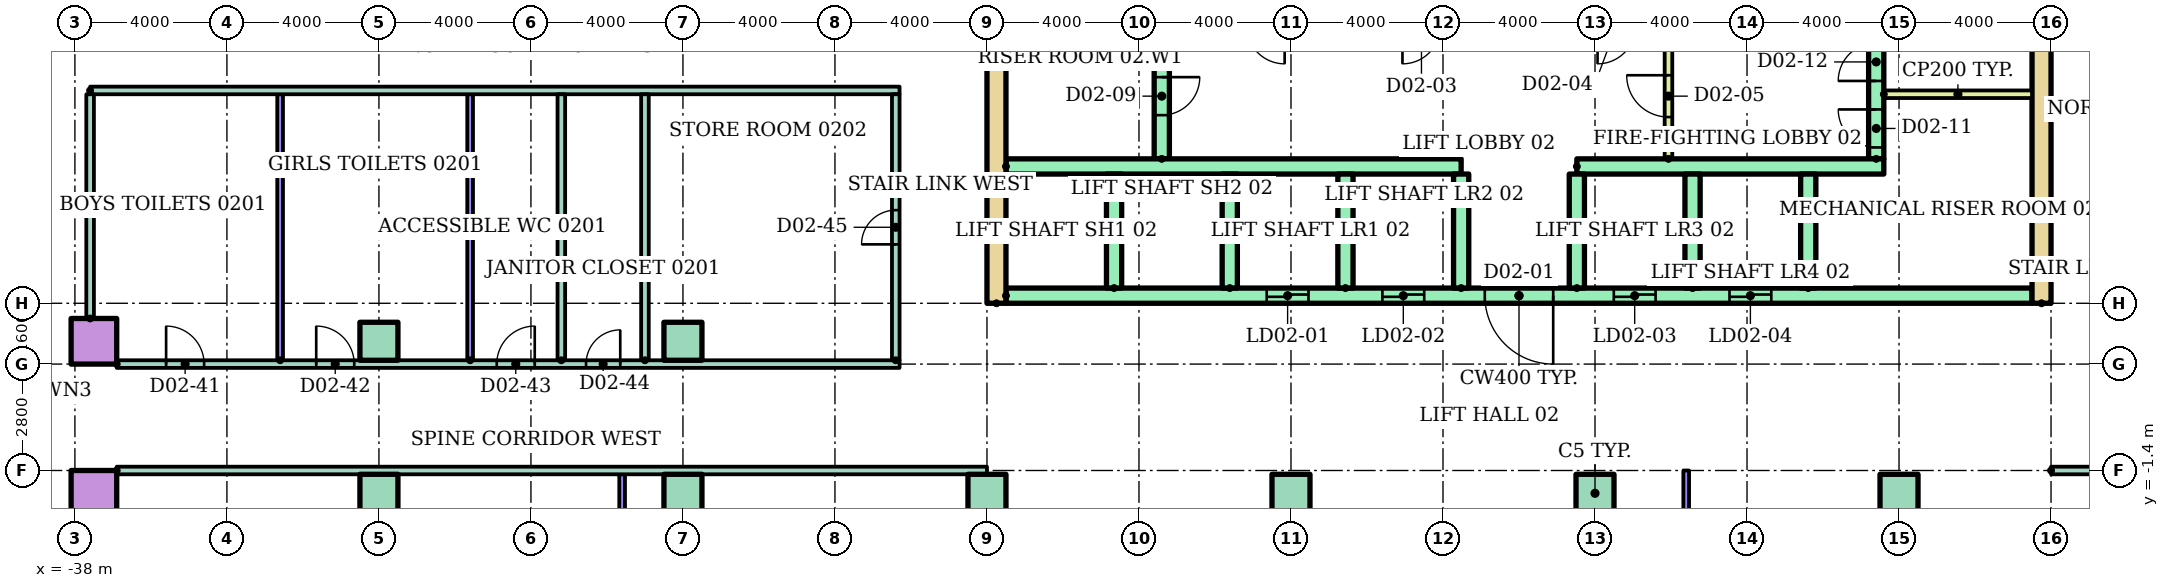
"""IFC4 building model, lengths in metres.
Left out: names, types, materials, properties, quantities, classifications, styles, units other than length and angle.
Written with IfcOpenShell. Run it as: python <this file> out.ifc"""

import sys

from ifc_helpers import new_model, si_unit, direction, frame, frame_2d, origin, origin_2d, place, context, subcontext, project, spatial, rectangle, hollow_rectangle, extrude, element, fill, save


model = new_model("IFC4")
c1 = context("Model", 3, precision=1e-05, world=origin(), true_north=direction((0.0, 1.0)))
c2 = subcontext(c1, "Body", "Model", "MODEL_VIEW")
j1 = project(units=[si_unit("LENGTHUNIT", "METRE"), si_unit("PLANEANGLEUNIT", "RADIAN")], contexts=[c1])
p1 = place(None, origin())
s1 = spatial("IfcSite", under=j1, at=p1, CompositionType="ELEMENT")
p2 = place(p1, origin())
s2 = spatial("IfcBuilding", under=s1, at=p2, CompositionType="ELEMENT")
p3 = place(p2, frame((0.0, 0.0, 10.0)))
s3 = spatial("IfcBuildingStorey", under=s2, at=p3, CompositionType="ELEMENT", Elevation=10.0)
p4 = place(p3, frame((-37.5, -2.0, 0.0)))
e1 = element("IfcColumn", 1, at=p4, inside=s3, PredefinedType="COLUMN", context=c2, shape_type="SweptSolid", body=[
    extrude(hollow_rectangle(XDim=1.2, YDim=1.2, WallThickness=0.06, at=origin_2d()), origin(), (0.0, 0.0, 1.0), 4.0),
])
for number, where in (
    (2, (-30.0, -2.0, 0.0)),
    (3, (-22.0, -2.0, 0.0)),
    (4, (-14.0, -2.0, 0.0)),
    (5, (-6.0, -2.0, 0.0)),
    (6, (2.0, -2.0, 0.0)),
    (7, (10.0, -2.0, 0.0)),
):
    element("IfcColumn", number, at=place(p3, frame(where)), inside=s3, PredefinedType="COLUMN", context=c2, shape_type="SweptSolid", body=[
        extrude(rectangle(XDim=1.0, YDim=1.0, at=origin_2d()), origin(), (0.0, 0.0, 1.0), 4.0),
    ])
p5 = place(p3, frame((-37.5, 2.0, 0.0)))
e8 = element("IfcColumn", 8, at=p5, inside=s3, PredefinedType="COLUMN", context=c2, shape_type="SweptSolid", body=[
    extrude(hollow_rectangle(XDim=1.2, YDim=1.2, WallThickness=0.06, at=origin_2d()), origin(), (0.0, 0.0, 1.0), 4.0),
])
for number, where in (
    (9, (-30.0, 2.0, 0.0)),
    (10, (-22.0, 2.0, 0.0)),
):
    element("IfcColumn", number, at=place(p3, frame(where)), inside=s3, PredefinedType="COLUMN", context=c2, shape_type="SweptSolid", body=[
        extrude(rectangle(XDim=1.0, YDim=1.0, at=origin_2d()), origin(), (0.0, 0.0, 1.0), 4.0),
    ])
for number, where, z_axis, x_axis in (
    (11, (-13.75, 3.0, 0.0), (0.0, 0.0, 1.0), (0.0, 1.0, 0.0)),
    (12, (13.75, 3.0, 0.0), (0.0, 0.0, 1.0), (0.0, 1.0, 0.0)),
):
    element("IfcWall", number, at=place(p3, frame(where, z_axis=z_axis, x_axis=x_axis)), inside=s3, PredefinedType="SHEAR", context=c2, shape_type="SweptSolid", body=[
        extrude(rectangle(XDim=17.0, YDim=0.5, at=frame_2d((8.5, 0.0))), origin(), (0.0, 0.0, 1.0), 3.7),
    ])
p6 = place(p3, frame((-9.4, 6.8, 0.0), z_axis=(0.0, 0.0, 1.0), x_axis=(0.0, 1.0, 0.0)))
e13 = element("IfcWall", 13, at=p6, inside=s3, PredefinedType="SHEAR", context=c2, shape_type="SweptSolid", body=[
    extrude(rectangle(XDim=12.7, YDim=0.4, at=frame_2d((6.35, 0.0))), origin(), (0.0, 0.0, 1.0), 3.7),
])
p7 = place(p6, frame((1.15, 0.0, 0.0)))
e14 = element("IfcOpeningElement", 14, at=p7, cuts=e13, PredefinedType="OPENING", context=c2, shape_type="SweptSolid", body=[
    extrude(rectangle(XDim=1.0, YDim=2.1, at=frame_2d((0.5, 1.05))), frame((0.0, 0.21, 0.0), z_axis=(0.0, -1.0, 0.0), x_axis=(1.0, 0.0, 0.0)), (0.0, 0.0, 1.0), 0.42),
])
p8 = place(p6, frame((7.925, 0.0, 0.0)))
e15 = element("IfcOpeningElement", 15, at=p8, cuts=e13, PredefinedType="OPENING", context=c2, shape_type="SweptSolid", body=[
    extrude(rectangle(XDim=1.0, YDim=2.1, at=frame_2d((0.5, 1.05))), frame((0.0, 0.21, 0.0), z_axis=(0.0, -1.0, 0.0), x_axis=(1.0, 0.0, 0.0)), (0.0, 0.0, 1.0), 0.42),
])
p9 = place(p3, frame((9.4, 6.8, 0.0), z_axis=(0.0, 0.0, 1.0), x_axis=(0.0, 1.0, 0.0)))
e16 = element("IfcWall", 16, at=p9, inside=s3, PredefinedType="SHEAR", context=c2, shape_type="SweptSolid", body=[
    extrude(rectangle(XDim=12.7, YDim=0.4, at=frame_2d((6.35, 0.0))), origin(), (0.0, 0.0, 1.0), 3.7),
])
p10 = place(p9, frame((0.3, 0.0, 0.0)))
e17 = element("IfcOpeningElement", 17, at=p10, cuts=e16, PredefinedType="OPENING", context=c2, shape_type="SweptSolid", body=[
    extrude(rectangle(XDim=1.0, YDim=2.1, at=frame_2d((0.5, 1.05))), frame((0.0, 0.21, 0.0), z_axis=(0.0, -1.0, 0.0), x_axis=(1.0, 0.0, 0.0)), (0.0, 0.0, 1.0), 0.42),
])
p11 = place(p9, frame((2.05, 0.0, 0.0)))
e18 = element("IfcOpeningElement", 18, at=p11, cuts=e16, PredefinedType="OPENING", context=c2, shape_type="SweptSolid", body=[
    extrude(rectangle(XDim=1.0, YDim=2.1, at=frame_2d((0.5, 1.05))), frame((0.0, 0.21, 0.0), z_axis=(0.0, -1.0, 0.0), x_axis=(1.0, 0.0, 0.0)), (0.0, 0.0, 1.0), 0.42),
])
p12 = place(p9, frame((7.925, 0.0, 0.0)))
e19 = element("IfcOpeningElement", 19, at=p12, cuts=e16, PredefinedType="OPENING", context=c2, shape_type="SweptSolid", body=[
    extrude(rectangle(XDim=1.0, YDim=2.1, at=frame_2d((0.5, 1.05))), frame((0.0, 0.21, 0.0), z_axis=(0.0, -1.0, 0.0), x_axis=(1.0, 0.0, 0.0)), (0.0, 0.0, 1.0), 0.42),
])
p13 = place(p3, frame((-13.5, 3.2, 0.0)))
e20 = element("IfcWall", 20, at=p13, inside=s3, PredefinedType="SHEAR", context=c2, shape_type="SweptSolid", body=[
    extrude(rectangle(XDim=27.0, YDim=0.4, at=frame_2d((13.5, 0.0))), origin(), (0.0, 0.0, 1.0), 3.7),
])
p14 = place(p13, frame((6.861, 0.0, 0.0)))
e21 = element("IfcOpeningElement", 21, at=p14, cuts=e20, PredefinedType="OPENING", context=c2, shape_type="SweptSolid", body=[
    extrude(rectangle(XDim=1.1, YDim=2.1, at=frame_2d((0.55, 1.05))), frame((0.0, 0.21, 0.0), z_axis=(0.0, -1.0, 0.0), x_axis=(1.0, 0.0, 0.0)), (0.0, 0.0, 1.0), 0.42),
])
p15 = place(p13, frame((9.906, 0.0, 0.0)))
e22 = element("IfcOpeningElement", 22, at=p15, cuts=e20, PredefinedType="OPENING", context=c2, shape_type="SweptSolid", body=[
    extrude(rectangle(XDim=1.1, YDim=2.1, at=frame_2d((0.55, 1.05))), frame((0.0, 0.21, 0.0), z_axis=(0.0, -1.0, 0.0), x_axis=(1.0, 0.0, 0.0)), (0.0, 0.0, 1.0), 0.42),
])
p16 = place(p13, frame((15.994, 0.0, 0.0)))
e23 = element("IfcOpeningElement", 23, at=p16, cuts=e20, PredefinedType="OPENING", context=c2, shape_type="SweptSolid", body=[
    extrude(rectangle(XDim=1.1, YDim=2.1, at=frame_2d((0.55, 1.05))), frame((0.0, 0.21, 0.0), z_axis=(0.0, -1.0, 0.0), x_axis=(1.0, 0.0, 0.0)), (0.0, 0.0, 1.0), 0.42),
])
p17 = place(p13, frame((19.039, 0.0, 0.0)))
e24 = element("IfcOpeningElement", 24, at=p17, cuts=e20, PredefinedType="OPENING", context=c2, shape_type="SweptSolid", body=[
    extrude(rectangle(XDim=1.1, YDim=2.1, at=frame_2d((0.55, 1.05))), frame((0.0, 0.21, 0.0), z_axis=(0.0, -1.0, 0.0), x_axis=(1.0, 0.0, 0.0)), (0.0, 0.0, 1.0), 0.42),
])
p18 = place(p13, frame((12.6, 0.0, 0.0)))
e25 = element("IfcOpeningElement", 25, at=p18, cuts=e20, PredefinedType="OPENING", context=c2, shape_type="SweptSolid", body=[
    extrude(rectangle(XDim=1.8, YDim=2.1, at=frame_2d((0.9, 1.05))), frame((0.0, 0.21, 0.0), z_axis=(0.0, -1.0, 0.0), x_axis=(1.0, 0.0, 0.0)), (0.0, 0.0, 1.0), 0.42),
])
p19 = place(p3, frame((-13.5, 6.6, 0.0)))
e26 = element("IfcWall", 26, at=p19, inside=s3, PredefinedType="SHEAR", context=c2, shape_type="SweptSolid", body=[
    extrude(rectangle(XDim=11.978, YDim=0.4, at=frame_2d((5.989, 0.0))), origin(), (0.0, 0.0, 1.0), 3.7),
])
p20 = place(p3, frame((1.522, 6.6, 0.0)))
e27 = element("IfcWall", 27, at=p20, inside=s3, PredefinedType="SHEAR", context=c2, shape_type="SweptSolid", body=[
    extrude(rectangle(XDim=8.078, YDim=0.4, at=frame_2d((4.039, 0.0))), origin(), (0.0, 0.0, 1.0), 3.7),
])
for number, where, z_axis, x_axis in (
    (28, (-10.656, 3.4, 0.0), (0.0, 0.0, 1.0), (0.0, 1.0, 0.0)),
    (29, (-7.611, 3.4, 0.0), (0.0, 0.0, 1.0), (0.0, 1.0, 0.0)),
    (30, (-4.567, 3.4, 0.0), (0.0, 0.0, 1.0), (0.0, 1.0, 0.0)),
    (31, (-1.522, 3.4, 0.0), (0.0, 0.0, 1.0), (0.0, 1.0, 0.0)),
    (32, (1.522, 3.4, 0.0), (0.0, 0.0, 1.0), (0.0, 1.0, 0.0)),
    (33, (4.567, 3.4, 0.0), (0.0, 0.0, 1.0), (0.0, 1.0, 0.0)),
    (34, (7.611, 3.4, 0.0), (0.0, 0.0, 1.0), (0.0, 1.0, 0.0)),
):
    element("IfcWall", number, at=place(p3, frame(where, z_axis=z_axis, x_axis=x_axis)), inside=s3, PredefinedType="SHEAR", context=c2, shape_type="SweptSolid", body=[
        extrude(rectangle(XDim=3.0, YDim=0.4, at=frame_2d((1.5, 0.0))), origin(), (0.0, 0.0, 1.0), 3.7),
    ])
p21 = place(p3, frame((3.933, 6.8, 0.0), z_axis=(0.0, 0.0, 1.0), x_axis=(0.0, 1.0, 0.0)))
e35 = element("IfcWall", 35, at=p21, inside=s3, PredefinedType="PARTITIONING", context=c2, shape_type="SweptSolid", body=[
    extrude(rectangle(XDim=3.3, YDim=0.2, at=frame_2d((1.65, 0.0))), origin(), (0.0, 0.0, 1.0), 3.7),
])
p22 = place(p21, frame((1.1, 0.0, 0.0)))
e36 = element("IfcOpeningElement", 36, at=p22, cuts=e35, PredefinedType="OPENING", context=c2, shape_type="SweptSolid", body=[
    extrude(rectangle(XDim=1.1, YDim=2.1, at=frame_2d((0.55, 1.05))), frame((0.0, 0.11, 0.0), z_axis=(0.0, -1.0, 0.0), x_axis=(1.0, 0.0, 0.0)), (0.0, 0.0, 1.0), 0.22),
])
p23 = place(p3, frame((9.6, 8.5, 0.0)))
e37 = element("IfcWall", 37, at=p23, inside=s3, PredefinedType="PARTITIONING", context=c2, shape_type="SweptSolid", body=[
    extrude(rectangle(XDim=3.9, YDim=0.2, at=frame_2d((1.95, 0.0))), origin(), (0.0, 0.0, 1.0), 3.7),
])
for number, where in (
    (38, (-36.9, -1.4, 0.0)),
    (39, (14.0, -1.4, 0.0)),
):
    element("IfcWall", number, at=place(p3, frame(where)), inside=s3, PredefinedType="PARTITIONING", context=c2, shape_type="SweptSolid", body=[
        extrude(rectangle(XDim=22.9, YDim=0.2, at=frame_2d((11.45, 0.0))), origin(), (0.0, 0.0, 1.0), 3.7),
    ])
p24 = place(p3, frame((-36.9, 1.4, 0.0)))
e40 = element("IfcWall", 40, at=p24, inside=s3, PredefinedType="PARTITIONING", context=c2, shape_type="SweptSolid", body=[
    extrude(rectangle(XDim=20.6, YDim=0.2, at=frame_2d((10.3, 0.0))), origin(), (0.0, 0.0, 1.0), 3.7),
])
p25 = place(p24, frame((1.3, 0.0, 0.0)))
e41 = element("IfcOpeningElement", 41, at=p25, cuts=e40, PredefinedType="OPENING", context=c2, shape_type="SweptSolid", body=[
    extrude(rectangle(XDim=1.0, YDim=2.1, at=frame_2d((0.5, 1.05))), frame((0.0, 0.11, 0.0), z_axis=(0.0, -1.0, 0.0), x_axis=(1.0, 0.0, 0.0)), (0.0, 0.0, 1.0), 0.22),
])
p26 = place(p24, frame((5.25, 0.0, 0.0)))
e42 = element("IfcOpeningElement", 42, at=p26, cuts=e40, PredefinedType="OPENING", context=c2, shape_type="SweptSolid", body=[
    extrude(rectangle(XDim=1.0, YDim=2.1, at=frame_2d((0.5, 1.05))), frame((0.0, 0.11, 0.0), z_axis=(0.0, -1.0, 0.0), x_axis=(1.0, 0.0, 0.0)), (0.0, 0.0, 1.0), 0.22),
])
p27 = place(p24, frame((10.0, 0.0, 0.0)))
e43 = element("IfcOpeningElement", 43, at=p27, cuts=e40, PredefinedType="OPENING", context=c2, shape_type="SweptSolid", body=[
    extrude(rectangle(XDim=1.0, YDim=2.1, at=frame_2d((0.5, 1.05))), frame((0.0, 0.11, 0.0), z_axis=(0.0, -1.0, 0.0), x_axis=(1.0, 0.0, 0.0)), (0.0, 0.0, 1.0), 0.22),
])
p28 = place(p24, frame((12.35, 0.0, 0.0)))
e44 = element("IfcOpeningElement", 44, at=p28, cuts=e40, PredefinedType="OPENING", context=c2, shape_type="SweptSolid", body=[
    extrude(rectangle(XDim=0.9, YDim=2.1, at=frame_2d((0.45, 1.05))), frame((0.0, 0.11, 0.0), z_axis=(0.0, -1.0, 0.0), x_axis=(1.0, 0.0, 0.0)), (0.0, 0.0, 1.0), 0.22),
])
p29 = place(p3, frame((-37.6, 8.6, 0.0)))
e45 = element("IfcWall", 45, at=p29, inside=s3, PredefinedType="PARTITIONING", context=c2, shape_type="SweptSolid", body=[
    extrude(rectangle(XDim=21.3, YDim=0.2, at=frame_2d((10.65, 0.0))), origin(), (0.0, 0.0, 1.0), 3.7),
])
p30 = place(p3, frame((-37.6, 2.6, 0.0), z_axis=(0.0, 0.0, 1.0), x_axis=(0.0, 1.0, 0.0)))
e46 = element("IfcWall", 46, at=p30, inside=s3, PredefinedType="PARTITIONING", context=c2, shape_type="SweptSolid", body=[
    extrude(rectangle(XDim=5.9, YDim=0.2, at=frame_2d((2.95, 0.0))), origin(), (0.0, 0.0, 1.0), 3.7),
])
for number, where, z_axis, x_axis in (
    (47, (-32.6, 1.5, 0.0), (0.0, 0.0, 1.0), (0.0, 1.0, 0.0)),
    (48, (-27.6, 1.5, 0.0), (0.0, 0.0, 1.0), (0.0, 1.0, 0.0)),
):
    element("IfcWall", number, at=place(p3, frame(where, z_axis=z_axis, x_axis=x_axis)), inside=s3, PredefinedType="PARTITIONING", context=c2, shape_type="SweptSolid", body=[
        extrude(rectangle(XDim=7.0, YDim=0.15, at=frame_2d((3.5, 0.0))), origin(), (0.0, 0.0, 1.0), 3.7),
    ])
p31 = place(p3, frame((-25.2, 1.5, 0.0), z_axis=(0.0, 0.0, 1.0), x_axis=(0.0, 1.0, 0.0)))
e49 = element("IfcWall", 49, at=p31, inside=s3, PredefinedType="PARTITIONING", context=c2, shape_type="SweptSolid", body=[
    extrude(rectangle(XDim=7.0, YDim=0.2, at=frame_2d((3.5, 0.0))), origin(), (0.0, 0.0, 1.0), 3.7),
])
p32 = place(p3, frame((-23.6, -6.25, 0.0), z_axis=(0.0, 0.0, 1.0), x_axis=(0.0, 1.0, 0.0)))
e50 = element("IfcWall", 50, at=p32, inside=s3, PredefinedType="PARTITIONING", context=c2, shape_type="SweptSolid", body=[
    extrude(rectangle(XDim=4.75, YDim=0.15, at=frame_2d((2.375, 0.0))), origin(), (0.0, 0.0, 1.0), 3.7),
])
p33 = place(p3, frame((-23.0, 1.5, 0.0), z_axis=(0.0, 0.0, 1.0), x_axis=(0.0, 1.0, 0.0)))
e51 = element("IfcWall", 51, at=p33, inside=s3, PredefinedType="PARTITIONING", context=c2, shape_type="SweptSolid", body=[
    extrude(rectangle(XDim=7.0, YDim=0.2, at=frame_2d((3.5, 0.0))), origin(), (0.0, 0.0, 1.0), 3.7),
])
p34 = place(p3, frame((-16.4, 1.5, 0.0), z_axis=(0.0, 0.0, 1.0), x_axis=(0.0, 1.0, 0.0)))
e52 = element("IfcWall", 52, at=p34, inside=s3, PredefinedType="PARTITIONING", context=c2, shape_type="SweptSolid", body=[
    extrude(rectangle(XDim=7.0, YDim=0.2, at=frame_2d((3.5, 0.0))), origin(), (0.0, 0.0, 1.0), 3.7),
])
p35 = place(p34, frame((3.05, 0.0, 0.0)))
e53 = element("IfcOpeningElement", 53, at=p35, cuts=e52, PredefinedType="OPENING", context=c2, shape_type="SweptSolid", body=[
    extrude(rectangle(XDim=0.9, YDim=2.1, at=frame_2d((0.45, 1.05))), frame((0.0, 0.11, 0.0), z_axis=(0.0, -1.0, 0.0), x_axis=(1.0, 0.0, 0.0)), (0.0, 0.0, 1.0), 0.22),
])
p36 = place(p3, frame((4.4, -6.25, 0.0), z_axis=(0.0, 0.0, 1.0), x_axis=(0.0, 1.0, 0.0)))
e54 = element("IfcWall", 54, at=p36, inside=s3, PredefinedType="PARTITIONING", context=c2, shape_type="SweptSolid", body=[
    extrude(rectangle(XDim=4.85, YDim=0.15, at=frame_2d((2.425, 0.0))), origin(), (0.0, 0.0, 1.0), 3.7),
])
p37 = place(p14, origin())
e55 = element("IfcDoor", 55, at=p37, inside=s3, OperationType="SLIDING_TO_LEFT", PredefinedType="DOOR", context=c2, shape_type="SweptSolid", body=[
    extrude(rectangle(XDim=1.1, YDim=2.1, at=frame_2d((0.55, 1.05))), frame((0.0, 0.025, 0.0), z_axis=(0.0, -1.0, 0.0), x_axis=(1.0, 0.0, 0.0)), (0.0, 0.0, 1.0), 0.05),
])
fill(e21, e55)
p38 = place(p15, origin())
e56 = element("IfcDoor", 56, at=p38, inside=s3, OperationType="SLIDING_TO_LEFT", PredefinedType="DOOR", context=c2, shape_type="SweptSolid", body=[
    extrude(rectangle(XDim=1.1, YDim=2.1, at=frame_2d((0.55, 1.05))), frame((0.0, 0.025, 0.0), z_axis=(0.0, -1.0, 0.0), x_axis=(1.0, 0.0, 0.0)), (0.0, 0.0, 1.0), 0.05),
])
fill(e22, e56)
p39 = place(p16, origin())
e57 = element("IfcDoor", 57, at=p39, inside=s3, OperationType="SLIDING_TO_LEFT", PredefinedType="DOOR", context=c2, shape_type="SweptSolid", body=[
    extrude(rectangle(XDim=1.1, YDim=2.1, at=frame_2d((0.55, 1.05))), frame((0.0, 0.025, 0.0), z_axis=(0.0, -1.0, 0.0), x_axis=(1.0, 0.0, 0.0)), (0.0, 0.0, 1.0), 0.05),
])
fill(e23, e57)
p40 = place(p17, origin())
e58 = element("IfcDoor", 58, at=p40, inside=s3, OperationType="SLIDING_TO_LEFT", PredefinedType="DOOR", context=c2, shape_type="SweptSolid", body=[
    extrude(rectangle(XDim=1.1, YDim=2.1, at=frame_2d((0.55, 1.05))), frame((0.0, 0.025, 0.0), z_axis=(0.0, -1.0, 0.0), x_axis=(1.0, 0.0, 0.0)), (0.0, 0.0, 1.0), 0.05),
])
fill(e24, e58)
p41 = place(p18, frame((1.8, 0.0, 0.0), z_axis=(0.0, 0.0, 1.0), x_axis=(-1.0, 0.0, 0.0)))
e59 = element("IfcDoor", 59, at=p41, inside=s3, OperationType="DOUBLE_DOOR_SINGLE_SWING", PredefinedType="DOOR", context=c2, shape_type="SweptSolid", body=[
    extrude(rectangle(XDim=1.8, YDim=2.1, at=frame_2d((0.9, 1.05))), frame((0.0, 0.025, 0.0), z_axis=(0.0, -1.0, 0.0), x_axis=(1.0, 0.0, 0.0)), (0.0, 0.0, 1.0), 0.05),
])
fill(e25, e59)
p42 = place(p22, origin())
e60 = element("IfcDoor", 60, at=p42, inside=s3, OperationType="SINGLE_SWING_RIGHT", PredefinedType="DOOR", context=c2, shape_type="SweptSolid", body=[
    extrude(rectangle(XDim=1.1, YDim=2.1, at=frame_2d((0.55, 1.05))), frame((0.0, 0.025, 0.0), z_axis=(0.0, -1.0, 0.0), x_axis=(1.0, 0.0, 0.0)), (0.0, 0.0, 1.0), 0.05),
])
fill(e36, e60)
p43 = place(p7, frame((1.0, 0.0, 0.0), z_axis=(0.0, 0.0, 1.0), x_axis=(-1.0, 0.0, 0.0)))
e61 = element("IfcDoor", 61, at=p43, inside=s3, OperationType="SINGLE_SWING_RIGHT", PredefinedType="DOOR", context=c2, shape_type="SweptSolid", body=[
    extrude(rectangle(XDim=1.0, YDim=2.1, at=frame_2d((0.5, 1.05))), frame((0.0, 0.025, 0.0), z_axis=(0.0, -1.0, 0.0), x_axis=(1.0, 0.0, 0.0)), (0.0, 0.0, 1.0), 0.05),
])
fill(e14, e61)
p44 = place(p10, origin())
e62 = element("IfcDoor", 62, at=p44, inside=s3, OperationType="SINGLE_SWING_RIGHT", PredefinedType="DOOR", context=c2, shape_type="SweptSolid", body=[
    extrude(rectangle(XDim=1.0, YDim=2.1, at=frame_2d((0.5, 1.05))), frame((0.0, 0.025, 0.0), z_axis=(0.0, -1.0, 0.0), x_axis=(1.0, 0.0, 0.0)), (0.0, 0.0, 1.0), 0.05),
])
fill(e17, e62)
p45 = place(p11, origin())
e63 = element("IfcDoor", 63, at=p45, inside=s3, OperationType="SINGLE_SWING_LEFT", PredefinedType="DOOR", context=c2, shape_type="SweptSolid", body=[
    extrude(rectangle(XDim=1.0, YDim=2.1, at=frame_2d((0.5, 1.05))), frame((0.0, 0.025, 0.0), z_axis=(0.0, -1.0, 0.0), x_axis=(1.0, 0.0, 0.0)), (0.0, 0.0, 1.0), 0.05),
])
fill(e18, e63)
p46 = place(p25, origin())
e64 = element("IfcDoor", 64, at=p46, inside=s3, OperationType="SINGLE_SWING_LEFT", PredefinedType="DOOR", context=c2, shape_type="SweptSolid", body=[
    extrude(rectangle(XDim=1.0, YDim=2.1, at=frame_2d((0.5, 1.05))), frame((0.0, 0.025, 0.0), z_axis=(0.0, -1.0, 0.0), x_axis=(1.0, 0.0, 0.0)), (0.0, 0.0, 1.0), 0.05),
])
fill(e41, e64)
p47 = place(p26, origin())
e65 = element("IfcDoor", 65, at=p47, inside=s3, OperationType="SINGLE_SWING_LEFT", PredefinedType="DOOR", context=c2, shape_type="SweptSolid", body=[
    extrude(rectangle(XDim=1.0, YDim=2.1, at=frame_2d((0.5, 1.05))), frame((0.0, 0.025, 0.0), z_axis=(0.0, -1.0, 0.0), x_axis=(1.0, 0.0, 0.0)), (0.0, 0.0, 1.0), 0.05),
])
fill(e42, e65)
p48 = place(p27, origin())
e66 = element("IfcDoor", 66, at=p48, inside=s3, OperationType="SINGLE_SWING_RIGHT", PredefinedType="DOOR", context=c2, shape_type="SweptSolid", body=[
    extrude(rectangle(XDim=1.0, YDim=2.1, at=frame_2d((0.5, 1.05))), frame((0.0, 0.025, 0.0), z_axis=(0.0, -1.0, 0.0), x_axis=(1.0, 0.0, 0.0)), (0.0, 0.0, 1.0), 0.05),
])
fill(e43, e66)
p49 = place(p28, origin())
e67 = element("IfcDoor", 67, at=p49, inside=s3, OperationType="SINGLE_SWING_RIGHT", PredefinedType="DOOR", context=c2, shape_type="SweptSolid", body=[
    extrude(rectangle(XDim=0.9, YDim=2.1, at=frame_2d((0.45, 1.05))), frame((0.0, 0.025, 0.0), z_axis=(0.0, -1.0, 0.0), x_axis=(1.0, 0.0, 0.0)), (0.0, 0.0, 1.0), 0.05),
])
fill(e44, e67)
p50 = place(p35, origin())
e68 = element("IfcDoor", 68, at=p50, inside=s3, OperationType="SINGLE_SWING_LEFT", PredefinedType="DOOR", context=c2, shape_type="SweptSolid", body=[
    extrude(rectangle(XDim=0.9, YDim=2.1, at=frame_2d((0.45, 1.05))), frame((0.0, 0.025, 0.0), z_axis=(0.0, -1.0, 0.0), x_axis=(1.0, 0.0, 0.0)), (0.0, 0.0, 1.0), 0.05),
])
fill(e53, e68)
save(model, sys.argv[1])
